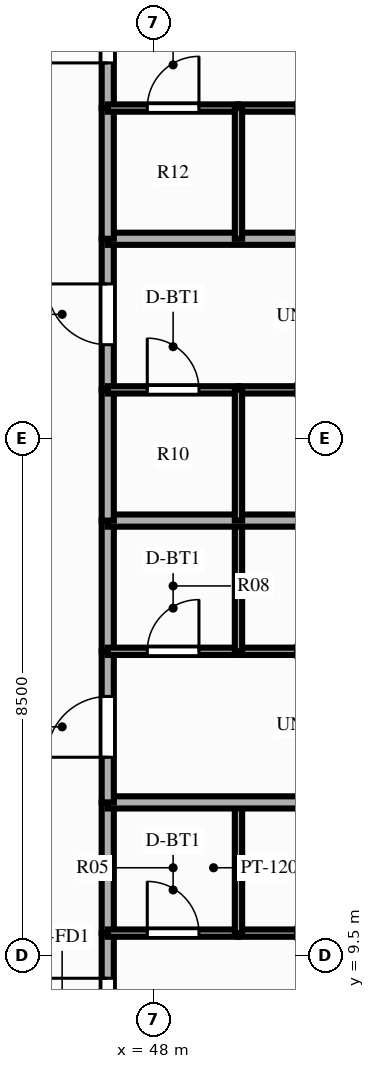
"""IFC4 building model, lengths in metres.
Left out: names, types, materials, properties, quantities, classifications, styles, units other than length and angle.
Written with IfcOpenShell. Run it as: python <this file> out.ifc"""

import sys

from ifc_helpers import new_model, si_unit, direction, frame, frame_2d, origin, place, context, subcontext, project, spatial, rectangle, extrude, source, transform, mapped, element, fill, save


model = new_model("IFC4")
c1 = context("Model", 3, precision=1e-05, world=origin(), true_north=direction((0.0, 1.0)))
c2 = subcontext(c1, "Body", "Model", "MODEL_VIEW")
j1 = project(units=[si_unit("LENGTHUNIT", "METRE"), si_unit("PLANEANGLEUNIT", "RADIAN")], contexts=[c1])
p1 = place(None, origin())
s1 = spatial("IfcSite", under=j1, at=p1, CompositionType="ELEMENT")
p2 = place(p1, origin())
s2 = spatial("IfcBuilding", under=s1, at=p2, CompositionType="ELEMENT")
p3 = place(p2, frame((0.0, 0.0, 122.85)))
s3 = spatial("IfcBuildingStorey", under=s2, at=p3, CompositionType="ELEMENT", Elevation=122.85)
p4 = place(p3, frame((47.25, 7.38, 0.0), z_axis=(0.0, 0.0, 1.0), x_axis=(0.0, 1.0, 0.0)))
e1 = element("IfcWall", 1, at=p4, inside=s3, PredefinedType="PARTITIONING", context=c2, shape_type="SweptSolid", body=[
    extrude(rectangle(XDim=2.485, YDim=0.2, at=frame_2d((1.243, 0.0))), origin(), (0.0, 0.0, 1.0), 3.56),
])
p5 = place(p4, frame((0.742, 0.0, 0.0)))
e2 = element("IfcOpeningElement", 2, at=p5, cuts=e1, PredefinedType="OPENING", context=c2, shape_type="SweptSolid", body=[
    extrude(rectangle(XDim=1.0, YDim=2.15, at=frame_2d((0.5, 1.075))), frame((0.0, 0.112, 0.0), z_axis=(0.0, -1.0, 0.0), x_axis=(1.0, 0.0, 0.0)), (0.0, 0.0, 1.0), 0.224),
])
p6 = place(p3, frame((47.25, 9.865, 0.0), z_axis=(0.0, 0.0, 1.0), x_axis=(0.0, 1.0, 0.0)))
e3 = element("IfcWall", 3, at=p6, inside=s3, PredefinedType="PARTITIONING", context=c2, shape_type="SweptSolid", body=[
    extrude(rectangle(XDim=2.15, YDim=0.2, at=frame_2d((1.075, 0.0))), origin(), (0.0, 0.0, 1.0), 3.56),
])
p7 = place(p3, frame((47.25, 9.865, 0.0), z_axis=(0.0, 0.0, 1.0), x_axis=(1.0, 0.0, 0.0)))
e4 = element("IfcWall", 4, at=p7, inside=s3, PredefinedType="PARTITIONING", context=c2, shape_type="SweptSolid", body=[
    extrude(rectangle(XDim=2.15, YDim=0.12, at=frame_2d((1.075, 0.0))), origin(), (0.0, 0.0, 1.0), 3.56),
])
p8 = place(p7, frame((0.65, 0.0, 0.0)))
e5 = element("IfcOpeningElement", 5, at=p8, cuts=e4, PredefinedType="OPENING", context=c2, shape_type="SweptSolid", body=[
    extrude(rectangle(XDim=0.85, YDim=2.05, at=frame_2d((0.425, 1.025))), frame((0.0, 0.072, 0.0), z_axis=(0.0, -1.0, 0.0), x_axis=(1.0, 0.0, 0.0)), (0.0, 0.0, 1.0), 0.144),
])
p9 = place(p3, frame((49.4, 9.865, 0.0), z_axis=(0.0, 0.0, 1.0), x_axis=(1.0, 0.0, 0.0)))
e6 = element("IfcWall", 6, at=p9, inside=s3, PredefinedType="PARTITIONING", context=c2, shape_type="SweptSolid", body=[
    extrude(rectangle(XDim=0.97, YDim=0.12, at=frame_2d((0.485, 0.0))), origin(), (0.0, 0.0, 1.0), 3.56),
])
p10 = place(p3, frame((49.4, 9.865, 0.0), z_axis=(0.0, 0.0, 1.0), x_axis=(0.0, 1.0, 0.0)))
e7 = element("IfcWall", 7, at=p10, inside=s3, PredefinedType="PARTITIONING", context=c2, shape_type="SweptSolid", body=[
    extrude(rectangle(XDim=2.15, YDim=0.12, at=frame_2d((1.075, 0.0))), origin(), (0.0, 0.0, 1.0), 3.56),
])
p11 = place(p3, frame((47.25, 12.015, 0.0), z_axis=(0.0, 0.0, 1.0), x_axis=(1.0, 0.0, 0.0)))
e8 = element("IfcWall", 8, at=p11, inside=s3, PredefinedType="PARTITIONING", context=c2, shape_type="SweptSolid", body=[
    extrude(rectangle(XDim=16.6, YDim=0.2, at=frame_2d((8.3, 0.0))), origin(), (0.0, 0.0, 1.0), 3.56),
])
p12 = place(p3, frame((47.25, 12.015, 0.0), z_axis=(0.0, 0.0, 1.0), x_axis=(0.0, 1.0, 0.0)))
e9 = element("IfcWall", 9, at=p12, inside=s3, PredefinedType="PARTITIONING", context=c2, shape_type="SweptSolid", body=[
    extrude(rectangle(XDim=2.485, YDim=0.2, at=frame_2d((1.243, 0.0))), origin(), (0.0, 0.0, 1.0), 3.56),
])
p13 = place(p12, frame((0.742, 0.0, 0.0)))
e10 = element("IfcOpeningElement", 10, at=p13, cuts=e9, PredefinedType="OPENING", context=c2, shape_type="SweptSolid", body=[
    extrude(rectangle(XDim=1.0, YDim=2.15, at=frame_2d((0.5, 1.075))), frame((0.0, 0.112, 0.0), z_axis=(0.0, -1.0, 0.0), x_axis=(1.0, 0.0, 0.0)), (0.0, 0.0, 1.0), 0.224),
])
p14 = place(p3, frame((47.25, 14.5, 0.0), z_axis=(0.0, 0.0, 1.0), x_axis=(0.0, 1.0, 0.0)))
e11 = element("IfcWall", 11, at=p14, inside=s3, PredefinedType="PARTITIONING", context=c2, shape_type="SweptSolid", body=[
    extrude(rectangle(XDim=2.15, YDim=0.2, at=frame_2d((1.075, 0.0))), origin(), (0.0, 0.0, 1.0), 3.56),
])
p15 = place(p3, frame((47.25, 14.5, 0.0), z_axis=(0.0, 0.0, 1.0), x_axis=(1.0, 0.0, 0.0)))
e12 = element("IfcWall", 12, at=p15, inside=s3, PredefinedType="PARTITIONING", context=c2, shape_type="SweptSolid", body=[
    extrude(rectangle(XDim=2.15, YDim=0.12, at=frame_2d((1.075, 0.0))), origin(), (0.0, 0.0, 1.0), 3.56),
])
p16 = place(p15, frame((0.65, 0.0, 0.0)))
e13 = element("IfcOpeningElement", 13, at=p16, cuts=e12, PredefinedType="OPENING", context=c2, shape_type="SweptSolid", body=[
    extrude(rectangle(XDim=0.85, YDim=2.05, at=frame_2d((0.425, 1.025))), frame((0.0, 0.072, 0.0), z_axis=(0.0, -1.0, 0.0), x_axis=(1.0, 0.0, 0.0)), (0.0, 0.0, 1.0), 0.144),
])
p17 = place(p3, frame((49.4, 14.5, 0.0), z_axis=(0.0, 0.0, 1.0), x_axis=(1.0, 0.0, 0.0)))
e14 = element("IfcWall", 14, at=p17, inside=s3, PredefinedType="PARTITIONING", context=c2, shape_type="SweptSolid", body=[
    extrude(rectangle(XDim=0.97, YDim=0.12, at=frame_2d((0.485, 0.0))), origin(), (0.0, 0.0, 1.0), 3.56),
])
p18 = place(p3, frame((49.4, 14.5, 0.0), z_axis=(0.0, 0.0, 1.0), x_axis=(0.0, 1.0, 0.0)))
e15 = element("IfcWall", 15, at=p18, inside=s3, PredefinedType="PARTITIONING", context=c2, shape_type="SweptSolid", body=[
    extrude(rectangle(XDim=2.15, YDim=0.12, at=frame_2d((1.075, 0.0))), origin(), (0.0, 0.0, 1.0), 3.56),
])
p19 = place(p3, frame((47.25, 16.65, 0.0), z_axis=(0.0, 0.0, 1.0), x_axis=(1.0, 0.0, 0.0)))
e16 = element("IfcWall", 16, at=p19, inside=s3, PredefinedType="PARTITIONING", context=c2, shape_type="SweptSolid", body=[
    extrude(rectangle(XDim=16.6, YDim=0.2, at=frame_2d((8.3, 0.0))), origin(), (0.0, 0.0, 1.0), 3.56),
])
p20 = place(p3, frame((47.25, 16.65, 0.0), z_axis=(0.0, 0.0, 1.0), x_axis=(0.0, 1.0, 0.0)))
e17 = element("IfcWall", 17, at=p20, inside=s3, PredefinedType="PARTITIONING", context=c2, shape_type="SweptSolid", body=[
    extrude(rectangle(XDim=2.15, YDim=0.2, at=frame_2d((1.075, 0.0))), origin(), (0.0, 0.0, 1.0), 3.56),
])
p21 = place(p3, frame((47.25, 18.8, 0.0), z_axis=(0.0, 0.0, 1.0), x_axis=(0.0, 1.0, 0.0)))
e18 = element("IfcWall", 18, at=p21, inside=s3, PredefinedType="PARTITIONING", context=c2, shape_type="SweptSolid", body=[
    extrude(rectangle(XDim=2.485, YDim=0.2, at=frame_2d((1.242, 0.0))), origin(), (0.0, 0.0, 1.0), 3.56),
])
p22 = place(p21, frame((0.742, 0.0, 0.0)))
e19 = element("IfcOpeningElement", 19, at=p22, cuts=e18, PredefinedType="OPENING", context=c2, shape_type="SweptSolid", body=[
    extrude(rectangle(XDim=1.0, YDim=2.15, at=frame_2d((0.5, 1.075))), frame((0.0, 0.112, 0.0), z_axis=(0.0, -1.0, 0.0), x_axis=(1.0, 0.0, 0.0)), (0.0, 0.0, 1.0), 0.224),
])
p23 = place(p3, frame((47.25, 18.8, 0.0), z_axis=(0.0, 0.0, 1.0), x_axis=(1.0, 0.0, 0.0)))
e20 = element("IfcWall", 20, at=p23, inside=s3, PredefinedType="PARTITIONING", context=c2, shape_type="SweptSolid", body=[
    extrude(rectangle(XDim=2.15, YDim=0.12, at=frame_2d((1.075, 0.0))), origin(), (0.0, 0.0, 1.0), 3.56),
])
p24 = place(p23, frame((0.65, 0.0, 0.0)))
e21 = element("IfcOpeningElement", 21, at=p24, cuts=e20, PredefinedType="OPENING", context=c2, shape_type="SweptSolid", body=[
    extrude(rectangle(XDim=0.85, YDim=2.05, at=frame_2d((0.425, 1.025))), frame((0.0, 0.072, 0.0), z_axis=(0.0, -1.0, 0.0), x_axis=(1.0, 0.0, 0.0)), (0.0, 0.0, 1.0), 0.144),
])
p25 = place(p3, frame((49.4, 18.8, 0.0), z_axis=(0.0, 0.0, 1.0), x_axis=(1.0, 0.0, 0.0)))
e22 = element("IfcWall", 22, at=p25, inside=s3, PredefinedType="PARTITIONING", context=c2, shape_type="SweptSolid", body=[
    extrude(rectangle(XDim=0.97, YDim=0.12, at=frame_2d((0.485, 0.0))), origin(), (0.0, 0.0, 1.0), 3.56),
])
p26 = place(p3, frame((49.4, 16.65, 0.0), z_axis=(0.0, 0.0, 1.0), x_axis=(0.0, 1.0, 0.0)))
e23 = element("IfcWall", 23, at=p26, inside=s3, PredefinedType="PARTITIONING", context=c2, shape_type="SweptSolid", body=[
    extrude(rectangle(XDim=2.15, YDim=0.12, at=frame_2d((1.075, 0.0))), origin(), (0.0, 0.0, 1.0), 3.56),
])
p27 = place(p3, frame((47.25, 21.285, 0.0), z_axis=(0.0, 0.0, 1.0), x_axis=(1.0, 0.0, 0.0)))
e24 = element("IfcWall", 24, at=p27, inside=s3, PredefinedType="PARTITIONING", context=c2, shape_type="SweptSolid", body=[
    extrude(rectangle(XDim=16.6, YDim=0.2, at=frame_2d((8.3, 0.0))), origin(), (0.0, 0.0, 1.0), 3.56),
])
p28 = place(p3, frame((47.25, 21.285, 0.0), z_axis=(0.0, 0.0, 1.0), x_axis=(0.0, 1.0, 0.0)))
e25 = element("IfcWall", 25, at=p28, inside=s3, PredefinedType="PARTITIONING", context=c2, shape_type="SweptSolid", body=[
    extrude(rectangle(XDim=2.15, YDim=0.2, at=frame_2d((1.075, 0.0))), origin(), (0.0, 0.0, 1.0), 3.56),
])
p29 = place(p3, frame((47.25, 23.435, 0.0), z_axis=(0.0, 0.0, 1.0), x_axis=(0.0, 1.0, 0.0)))
e26 = element("IfcWall", 26, at=p29, inside=s3, PredefinedType="PARTITIONING", context=c2, shape_type="SweptSolid", body=[
    extrude(rectangle(XDim=2.485, YDim=0.2, at=frame_2d((1.242, 0.0))), origin(), (0.0, 0.0, 1.0), 3.56),
])
p30 = place(p29, frame((0.742, 0.0, 0.0)))
e27 = element("IfcOpeningElement", 27, at=p30, cuts=e26, PredefinedType="OPENING", context=c2, shape_type="SweptSolid", body=[
    extrude(rectangle(XDim=1.0, YDim=2.15, at=frame_2d((0.5, 1.075))), frame((0.0, 0.112, 0.0), z_axis=(0.0, -1.0, 0.0), x_axis=(1.0, 0.0, 0.0)), (0.0, 0.0, 1.0), 0.224),
])
p31 = place(p3, frame((47.25, 23.435, 0.0), z_axis=(0.0, 0.0, 1.0), x_axis=(1.0, 0.0, 0.0)))
e28 = element("IfcWall", 28, at=p31, inside=s3, PredefinedType="PARTITIONING", context=c2, shape_type="SweptSolid", body=[
    extrude(rectangle(XDim=2.15, YDim=0.12, at=frame_2d((1.075, 0.0))), origin(), (0.0, 0.0, 1.0), 3.56),
])
p32 = place(p31, frame((0.65, 0.0, 0.0)))
e29 = element("IfcOpeningElement", 29, at=p32, cuts=e28, PredefinedType="OPENING", context=c2, shape_type="SweptSolid", body=[
    extrude(rectangle(XDim=0.85, YDim=2.05, at=frame_2d((0.425, 1.025))), frame((0.0, 0.072, 0.0), z_axis=(0.0, -1.0, 0.0), x_axis=(1.0, 0.0, 0.0)), (0.0, 0.0, 1.0), 0.144),
])
p33 = place(p3, frame((49.4, 23.435, 0.0), z_axis=(0.0, 0.0, 1.0), x_axis=(1.0, 0.0, 0.0)))
e30 = element("IfcWall", 30, at=p33, inside=s3, PredefinedType="PARTITIONING", context=c2, shape_type="SweptSolid", body=[
    extrude(rectangle(XDim=0.97, YDim=0.12, at=frame_2d((0.485, 0.0))), origin(), (0.0, 0.0, 1.0), 3.56),
])
p34 = place(p3, frame((49.4, 21.285, 0.0), z_axis=(0.0, 0.0, 1.0), x_axis=(0.0, 1.0, 0.0)))
e31 = element("IfcWall", 31, at=p34, inside=s3, PredefinedType="PARTITIONING", context=c2, shape_type="SweptSolid", body=[
    extrude(rectangle(XDim=2.15, YDim=0.12, at=frame_2d((1.075, 0.0))), origin(), (0.0, 0.0, 1.0), 3.56),
])
m1 = source(origin(), c2, "Body", "SweptSolid", [
    extrude(rectangle(XDim=1.0, YDim=2.15, at=frame_2d((0.5, 1.075))), frame((0.0, 0.025, 0.0), z_axis=(0.0, -1.0, 0.0), x_axis=(1.0, 0.0, 0.0)), (0.0, 0.0, 1.0), 0.05),
])
p35 = place(p5, origin())
e32 = element("IfcDoor", 32, at=p35, inside=s3, OperationType="SINGLE_SWING_RIGHT", PredefinedType="DOOR", context=c2, shape_type="MappedRepresentation", body=[
    mapped(m1, transform((0.0, 0.0, 0.0), scale=1.0)),
])
fill(e2, e32)
m2 = source(origin(), c2, "Body", "SweptSolid", [
    extrude(rectangle(XDim=0.85, YDim=2.05, at=frame_2d((0.425, 1.025))), frame((0.0, 0.025, 0.0), z_axis=(0.0, -1.0, 0.0), x_axis=(1.0, 0.0, 0.0)), (0.0, 0.0, 1.0), 0.05),
])
p36 = place(p8, origin())
e33 = element("IfcDoor", 33, at=p36, inside=s3, OperationType="SINGLE_SWING_LEFT", PredefinedType="DOOR", context=c2, shape_type="MappedRepresentation", body=[
    mapped(m2, transform((0.0, 0.0, 0.0), scale=1.0)),
])
fill(e5, e33)
p37 = place(p13, origin())
e34 = element("IfcDoor", 34, at=p37, inside=s3, OperationType="SINGLE_SWING_LEFT", PredefinedType="DOOR", context=c2, shape_type="MappedRepresentation", body=[
    mapped(m1, transform((0.0, 0.0, 0.0), scale=1.0)),
])
fill(e10, e34)
p38 = place(p16, origin())
e35 = element("IfcDoor", 35, at=p38, inside=s3, OperationType="SINGLE_SWING_RIGHT", PredefinedType="DOOR", context=c2, shape_type="MappedRepresentation", body=[
    mapped(m2, transform((0.0, 0.0, 0.0), scale=1.0)),
])
fill(e13, e35)
p39 = place(p22, origin())
e36 = element("IfcDoor", 36, at=p39, inside=s3, OperationType="SINGLE_SWING_RIGHT", PredefinedType="DOOR", context=c2, shape_type="MappedRepresentation", body=[
    mapped(m1, transform((0.0, 0.0, 0.0), scale=1.0)),
])
fill(e19, e36)
p40 = place(p24, origin())
e37 = element("IfcDoor", 37, at=p40, inside=s3, OperationType="SINGLE_SWING_LEFT", PredefinedType="DOOR", context=c2, shape_type="MappedRepresentation", body=[
    mapped(m2, transform((0.0, 0.0, 0.0), scale=1.0)),
])
fill(e21, e37)
p41 = place(p30, origin())
e38 = element("IfcDoor", 38, at=p41, inside=s3, OperationType="SINGLE_SWING_LEFT", PredefinedType="DOOR", context=c2, shape_type="MappedRepresentation", body=[
    mapped(m1, transform((0.0, 0.0, 0.0), scale=1.0)),
])
fill(e27, e38)
p42 = place(p32, origin())
e39 = element("IfcDoor", 39, at=p42, inside=s3, OperationType="SINGLE_SWING_RIGHT", PredefinedType="DOOR", context=c2, shape_type="MappedRepresentation", body=[
    mapped(m2, transform((0.0, 0.0, 0.0), scale=1.0)),
])
fill(e29, e39)
save(model, sys.argv[1])
